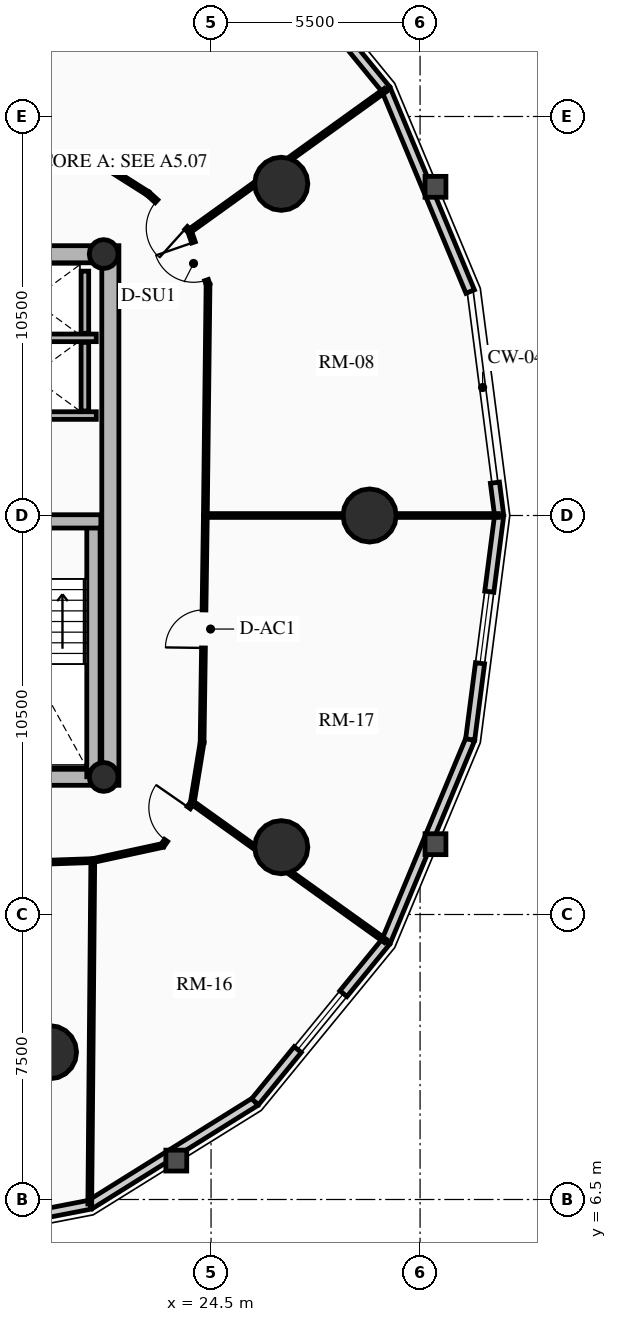
"""IFC4 building model, lengths in metres.
Left out: names, types, materials, properties, quantities, classifications, styles, units other than length and angle.
Written with IfcOpenShell. Run it as: python <this file> out.ifc"""

import sys

from ifc_helpers import new_model, si_unit, direction, frame, frame_2d, origin, origin_2d, place, context, subcontext, project, spatial, rectangle, circle, hollow_circle, extrude, source, transform, mapped, element, fill, save


model = new_model("IFC4")
c1 = context("Model", 3, precision=1e-05, world=origin(), true_north=direction((0.0, 1.0)))
c2 = subcontext(c1, "Body", "Model", "MODEL_VIEW")
j1 = project(units=[si_unit("LENGTHUNIT", "METRE"), si_unit("PLANEANGLEUNIT", "RADIAN")], contexts=[c1])
p1 = place(None, origin())
s1 = spatial("IfcSite", under=j1, at=p1, CompositionType="ELEMENT")
p2 = place(p1, origin())
s2 = spatial("IfcBuilding", under=s1, at=p2, CompositionType="ELEMENT")
p3 = place(p2, frame((0.0, 0.0, 96.34)))
s3 = spatial("IfcBuildingStorey", under=s2, at=p3, CompositionType="ELEMENT", Elevation=96.34)
p4 = place(p3, frame((21.85, 17.4, 0.0), z_axis=(0.0, 0.0, 1.0), x_axis=(0.0, 1.0, 0.0)))
e1 = element("IfcWall", 1, at=p4, inside=s3, PredefinedType="SHEAR", context=c2, shape_type="SweptSolid", body=[
    extrude(rectangle(XDim=14.2, YDim=0.45, at=frame_2d((7.1, 0.0))), origin(), (0.0, 0.0, 1.0), 2.91),
])
p5 = place(p3, frame((11.15, 17.625, 0.0), z_axis=(0.0, 0.0, 1.0), x_axis=(1.0, 0.0, 0.0)))
e2 = element("IfcWall", 2, at=p5, inside=s3, PredefinedType="SHEAR", context=c2, shape_type="SweptSolid", body=[
    extrude(rectangle(XDim=10.7, YDim=0.45, at=frame_2d((5.35, 0.0))), origin(), (0.0, 0.0, 1.0), 2.91),
])
m1 = source(origin(), c2, "Body", "SweptSolid", [
    extrude(rectangle(XDim=1.5, YDim=2.02, at=frame_2d((0.75, 1.01))), frame((0.0, 0.235, 0.0), z_axis=(0.0, -1.0, 0.0), x_axis=(1.0, 0.0, 0.0)), (0.0, 0.0, 1.0), 0.47),
])
p6 = place(p5, frame((5.45, 0.0, 0.0)))
e3 = element("IfcOpeningElement", 3, at=p6, cuts=e2, PredefinedType="OPENING", context=c2, shape_type="MappedRepresentation", body=[
    mapped(m1, transform((0.0, 0.0, 0.0), x_axis=(1.0, 0.0, 0.0), y_axis=(0.0, 1.0, 0.0), z_axis=(0.0, 0.0, 1.0), scale=1.0)),
])
p7 = place(p3, frame((11.15, 31.375, 0.0), z_axis=(0.0, 0.0, 1.0), x_axis=(1.0, 0.0, 0.0)))
e4 = element("IfcWall", 4, at=p7, inside=s3, PredefinedType="SHEAR", context=c2, shape_type="SweptSolid", body=[
    extrude(rectangle(XDim=10.7, YDim=0.45, at=frame_2d((5.35, 0.0))), origin(), (0.0, 0.0, 1.0), 2.91),
])
p8 = place(p7, frame((4.6, 0.0, 0.0)))
e5 = element("IfcOpeningElement", 5, at=p8, cuts=e4, PredefinedType="OPENING", context=c2, shape_type="MappedRepresentation", body=[
    mapped(m1, transform((0.0, 0.0, 0.0), x_axis=(1.0, 0.0, 0.0), y_axis=(0.0, 1.0, 0.0), z_axis=(0.0, 0.0, 1.0), scale=1.0)),
])
p9 = place(p3, frame((21.405, 17.625, 0.0), z_axis=(0.0, 0.0, 1.0), x_axis=(0.0, 1.0, 0.0)))
e6 = element("IfcWall", 6, at=p9, inside=s3, PredefinedType="SHEAR", context=c2, shape_type="SweptSolid", body=[
    extrude(rectangle(XDim=6.72, YDim=0.35, at=frame_2d((3.36, 0.0))), origin(), (0.0, 0.0, 1.0), 2.91),
])
p10 = place(p3, frame((18.315, 24.345, 0.0), z_axis=(0.0, 0.0, 1.0), x_axis=(1.0, 0.0, 0.0)))
e7 = element("IfcWall", 7, at=p10, inside=s3, PredefinedType="SHEAR", context=c2, shape_type="SweptSolid", body=[
    extrude(rectangle(XDim=3.285, YDim=0.35, at=frame_2d((1.643, 0.0))), origin(), (0.0, 0.0, 1.0), 2.91),
])
for number, where, z_axis, x_axis in (
    (8, (21.675, 17.62, 0.0), (0.0, 0.0, 1.0), (1.0, 0.0, 0.0)),
    (9, (21.675, 31.38, 0.0), (0.0, 0.0, 1.0), (1.0, 0.0, 0.0)),
):
    element("IfcColumn", number, at=place(p3, frame(where, z_axis=z_axis, x_axis=x_axis)), inside=s3, PredefinedType="COLUMN", context=c2, shape_type="SweptSolid", body=[
        extrude(hollow_circle(Radius=0.38, WallThickness=0.032, at=origin_2d()), origin(), (0.0, 0.0, 1.0), 2.91),
    ])
for number, where, z_axis, x_axis in (
    (10, (28.672, 24.5, 0.0), (0.0, 0.0, 1.0), (1.0, 0.0, 0.0)),
    (11, (26.347, 33.229, 0.0), (0.0, 0.0, 1.0), (1.0, 0.0, 0.0)),
    (12, (20.261, 10.377, 0.0), (0.0, 0.0, 1.0), (1.0, 0.0, 0.0)),
    (13, (26.347, 15.771, 0.0), (0.0, 0.0, 1.0), (1.0, 0.0, 0.0)),
):
    element("IfcColumn", number, at=place(p3, frame(where, z_axis=z_axis, x_axis=x_axis)), inside=s3, PredefinedType="USERDEFINED", context=c2, shape_type="SweptSolid", body=[
        extrude(circle(Radius=0.7, at=origin_2d()), origin(), (0.0, 0.0, 1.0), 2.91),
    ])
p11 = place(p3, frame((31.969, 25.363, 0.0), z_axis=(0.0, 0.0, 1.0), x_axis=(0.128523364007, -0.991706481225, 0.0)))
e14 = element("IfcWall", 14, at=p11, inside=s3, PredefinedType="SOLIDWALL", context=c2, shape_type="SweptSolid", body=[
    extrude(rectangle(XDim=0.87, YDim=0.24, at=frame_2d((0.435, 0.0))), origin(), (0.0, 0.0, 1.0), 2.655),
])
p12 = place(p3, frame((29.105, 35.709, 0.0), z_axis=(0.0, 0.0, 1.0), x_axis=(0.384344417632, -0.923189779317, 0.0)))
e15 = element("IfcWall", 15, at=p12, inside=s3, PredefinedType="SOLIDWALL", context=c2, shape_type="SweptSolid", body=[
    extrude(rectangle(XDim=5.758, YDim=0.24, at=frame_2d((2.879, 0.0))), origin(), (0.0, 0.0, 1.0), 2.179),
])
p13 = place(p3, frame((25.658, 39.928, 0.0), z_axis=(0.0, 0.0, 1.0), x_axis=(0.632700781152, -0.77439635945, 0.0)))
e16 = element("IfcWall", 16, at=p13, inside=s3, PredefinedType="SOLIDWALL", context=c2, shape_type="SweptSolid", body=[
    extrude(rectangle(XDim=5.448, YDim=0.24, at=frame_2d((2.724, 0.0))), origin(), (0.0, 0.0, 1.0), 2.179),
])
m2 = source(origin(), c2, "Body", "SweptSolid", [
    extrude(rectangle(XDim=1.9, YDim=1.35, at=frame_2d((0.95, 0.675))), frame((0.0, 0.13, 0.0), z_axis=(0.0, -1.0, 0.0), x_axis=(1.0, 0.0, 0.0)), (0.0, 0.0, 1.0), 0.26),
])
p14 = place(p13, frame((1.774, 0.0, 0.65)))
e17 = element("IfcOpeningElement", 17, at=p14, cuts=e16, PredefinedType="OPENING", context=c2, shape_type="MappedRepresentation", body=[
    mapped(m2, transform((0.0, 0.0, 0.0), x_axis=(1.0, 0.0, 0.0), y_axis=(0.0, 1.0, 0.0), z_axis=(0.0, 0.0, 1.0), scale=1.0)),
])
p15 = place(p3, frame((21.315, 6.363, 0.0), z_axis=(0.0, 0.0, 1.0), x_axis=(-0.981723785992, -0.190311344954, 0.0)))
e18 = element("IfcWall", 18, at=p15, inside=s3, PredefinedType="SOLIDWALL", context=c2, shape_type="SweptSolid", body=[
    extrude(rectangle(XDim=4.904, YDim=0.24, at=frame_2d((2.452, 0.0))), origin(), (0.0, 0.0, 1.0), 2.179),
])
m3 = source(origin(), c2, "Body", "SweptSolid", [
    extrude(rectangle(XDim=2.2, YDim=1.35, at=frame_2d((1.1, 0.675))), frame((0.0, 0.13, 0.0), z_axis=(0.0, -1.0, 0.0), x_axis=(1.0, 0.0, 0.0)), (0.0, 0.0, 1.0), 0.26),
])
p16 = place(p15, frame((1.352, 0.0, 0.65)))
e19 = element("IfcOpeningElement", 19, at=p16, cuts=e18, PredefinedType="OPENING", context=c2, shape_type="MappedRepresentation", body=[
    mapped(m3, transform((0.0, 0.0, 0.0), x_axis=(1.0, 0.0, 0.0), y_axis=(0.0, 1.0, 0.0), z_axis=(0.0, 0.0, 1.0), scale=1.0)),
])
p17 = place(p3, frame((25.658, 9.072, 0.0), z_axis=(0.0, 0.0, 1.0), x_axis=(-0.848520380187, -0.529162701263, 0.0)))
e20 = element("IfcWall", 20, at=p17, inside=s3, PredefinedType="SOLIDWALL", context=c2, shape_type="SweptSolid", body=[
    extrude(rectangle(XDim=5.119, YDim=0.24, at=frame_2d((2.56, 0.0))), origin(), (0.0, 0.0, 1.0), 2.179),
])
p18 = place(p3, frame((29.105, 13.291, 0.0), z_axis=(0.0, 0.0, 1.0), x_axis=(-0.632700781152, -0.77439635945, 0.0)))
e21 = element("IfcWall", 21, at=p18, inside=s3, PredefinedType="SOLIDWALL", context=c2, shape_type="SweptSolid", body=[
    extrude(rectangle(XDim=5.448, YDim=0.24, at=frame_2d((2.724, 0.0))), origin(), (0.0, 0.0, 1.0), 2.179),
])
p19 = place(p18, frame((1.774, 0.0, 0.65)))
e22 = element("IfcOpeningElement", 22, at=p19, cuts=e21, PredefinedType="OPENING", context=c2, shape_type="MappedRepresentation", body=[
    mapped(m2, transform((0.0, 0.0, 0.0), x_axis=(1.0, 0.0, 0.0), y_axis=(0.0, 1.0, 0.0), z_axis=(0.0, 0.0, 1.0), scale=1.0)),
])
p20 = place(p3, frame((31.318, 18.607, 0.0), z_axis=(0.0, 0.0, 1.0), x_axis=(-0.384344417632, -0.923189779317, 0.0)))
e23 = element("IfcWall", 23, at=p20, inside=s3, PredefinedType="SOLIDWALL", context=c2, shape_type="SweptSolid", body=[
    extrude(rectangle(XDim=5.758, YDim=0.24, at=frame_2d((2.879, 0.0))), origin(), (0.0, 0.0, 1.0), 2.179),
])
p21 = place(p3, frame((32.081, 24.5, 0.0), z_axis=(0.0, 0.0, 1.0), x_axis=(-0.128351991996, -0.991728675672, 0.0)))
e24 = element("IfcWall", 24, at=p21, inside=s3, PredefinedType="SOLIDWALL", context=c2, shape_type="SweptSolid", body=[
    extrude(rectangle(XDim=5.942, YDim=0.24, at=frame_2d((2.971, 0.0))), origin(), (0.0, 0.0, 1.0), 2.179),
])
p22 = place(p21, frame((2.021, 0.0, 0.65)))
e25 = element("IfcOpeningElement", 25, at=p22, cuts=e24, PredefinedType="OPENING", context=c2, shape_type="MappedRepresentation", body=[
    mapped(m2, transform((0.0, 0.0, 0.0), x_axis=(1.0, 0.0, 0.0), y_axis=(0.0, 1.0, 0.0), z_axis=(0.0, 0.0, 1.0), scale=1.0)),
])
for number, where, z_axis, x_axis in (
    (26, (18.51, 27.13, 0.0), (0.0, 0.0, 1.0), (1.0, 0.0, 0.0)),
    (27, (18.51, 29.175, 0.0), (0.0, 0.0, 1.0), (1.0, 0.0, 0.0)),
):
    element("IfcWall", number, at=place(p3, frame(where, z_axis=z_axis, x_axis=x_axis)), inside=s3, PredefinedType="SHEAR", context=c2, shape_type="SweptSolid", body=[
        extrude(rectangle(XDim=2.97, YDim=0.2, at=frame_2d((1.485, 0.0))), origin(), (0.0, 0.0, 1.0), 2.91),
    ])
p23 = place(p3, frame((21.18, 27.25, 0.0), z_axis=(0.0, 0.0, 1.0), x_axis=(0.0, 1.0, 0.0)))
e28 = element("IfcWall", 28, at=p23, inside=s3, PredefinedType="SHEAR", context=c2, shape_type="SweptSolid", body=[
    extrude(rectangle(XDim=1.805, YDim=0.2, at=frame_2d((0.902, 0.0))), origin(), (0.0, 0.0, 1.0), 2.91),
])
p24 = place(p3, frame((21.18, 29.295, 0.0), z_axis=(0.0, 0.0, 1.0), x_axis=(0.0, 1.0, 0.0)))
e29 = element("IfcWall", 29, at=p24, inside=s3, PredefinedType="SHEAR", context=c2, shape_type="SweptSolid", body=[
    extrude(rectangle(XDim=1.635, YDim=0.2, at=frame_2d((0.817, 0.0))), origin(), (0.0, 0.0, 1.0), 2.91),
])
p25 = place(p3, frame((24.35, 24.5, 0.0), z_axis=(0.0, 0.0, 1.0), x_axis=(0.011520250275, 0.999933639715, 0.0)))
e30 = element("IfcWall", 30, at=p25, inside=s3, PredefinedType="MOVABLE", context=c2, shape_type="SweptSolid", body=[
    extrude(rectangle(XDim=6.082, YDim=0.1, at=frame_2d((3.041, 0.0))), origin(), (0.0, 0.0, 1.0), 2.225),
])
p26 = place(p3, frame((24.42, 30.582, 0.0), z_axis=(0.0, 0.0, 1.0), x_axis=(-0.327437665675, 0.944872782494, 0.0)))
e31 = element("IfcWall", 31, at=p26, inside=s3, PredefinedType="MOVABLE", context=c2, shape_type="SweptSolid", body=[
    extrude(rectangle(XDim=1.487, YDim=0.1, at=frame_2d((0.743, 0.0))), origin(), (0.0, 0.0, 1.0), 2.225),
])
m4 = source(origin(), c2, "Body", "SweptSolid", [
    extrude(rectangle(XDim=1.05, YDim=2.015, at=frame_2d((0.525, 1.007))), frame((0.0, 0.06, 0.0), z_axis=(0.0, -1.0, 0.0), x_axis=(1.0, 0.0, 0.0)), (0.0, 0.0, 1.0), 0.12),
])
p27 = place(p26, frame((0.12, 0.0, 0.0)))
e32 = element("IfcOpeningElement", 32, at=p27, cuts=e31, PredefinedType="OPENING", context=c2, shape_type="MappedRepresentation", body=[
    mapped(m4, transform((0.0, 0.0, 0.0), x_axis=(1.0, 0.0, 0.0), y_axis=(0.0, 1.0, 0.0), z_axis=(0.0, 0.0, 1.0), scale=1.0)),
])
p28 = place(p3, frame((23.933, 31.987, 0.0), z_axis=(0.0, 0.0, 1.0), x_axis=(-0.742471347264, 0.669877823556, 0.0)))
e33 = element("IfcWall", 33, at=p28, inside=s3, PredefinedType="MOVABLE", context=c2, shape_type="SweptSolid", body=[
    extrude(rectangle(XDim=1.476, YDim=0.1, at=frame_2d((0.738, 0.0))), origin(), (0.0, 0.0, 1.0), 2.225),
])
p29 = place(p28, frame((0.12, 0.0, 0.0)))
e34 = element("IfcOpeningElement", 34, at=p29, cuts=e33, PredefinedType="OPENING", context=c2, shape_type="MappedRepresentation", body=[
    mapped(m4, transform((0.0, 0.0, 0.0), x_axis=(1.0, 0.0, 0.0), y_axis=(0.0, 1.0, 0.0), z_axis=(0.0, 0.0, 1.0), scale=1.0)),
])
p30 = place(p3, frame((22.837, 32.976, 0.0), z_axis=(0.0, 0.0, 1.0), x_axis=(-0.844976677144, 0.534803155454, 0.0)))
e35 = element("IfcWall", 35, at=p30, inside=s3, PredefinedType="MOVABLE", context=c2, shape_type="SweptSolid", body=[
    extrude(rectangle(XDim=1.587, YDim=0.1, at=frame_2d((0.793, 0.0))), origin(), (0.0, 0.0, 1.0), 2.225),
])
p31 = place(p3, frame((21.496, 33.824, 0.0), z_axis=(0.0, 0.0, 1.0), x_axis=(-0.999990516754, -0.004355043261, 0.0)))
e36 = element("IfcWall", 36, at=p31, inside=s3, PredefinedType="MOVABLE", context=c2, shape_type="SweptSolid", body=[
    extrude(rectangle(XDim=3.364, YDim=0.1, at=frame_2d((1.682, 0.0))), origin(), (0.0, 0.0, 1.0), 2.225),
])
p32 = place(p3, frame((14.792, 15.191, 0.0), z_axis=(0.0, 0.0, 1.0), x_axis=(0.999405559957, 0.034475015985, 0.0)))
e37 = element("IfcWall", 37, at=p32, inside=s3, PredefinedType="MOVABLE", context=c2, shape_type="SweptSolid", body=[
    extrude(rectangle(XDim=6.6, YDim=0.1, at=frame_2d((3.3, 0.0))), origin(), (0.0, 0.0, 1.0), 2.225),
])
p33 = place(p32, frame((2.775, 0.0, 0.0)))
e38 = element("IfcOpeningElement", 38, at=p33, cuts=e37, PredefinedType="OPENING", context=c2, shape_type="MappedRepresentation", body=[
    mapped(m4, transform((0.0, 0.0, 0.0), x_axis=(1.0, 0.0, 0.0), y_axis=(0.0, 1.0, 0.0), z_axis=(0.0, 0.0, 1.0), scale=1.0)),
])
p34 = place(p3, frame((21.388, 15.418, 0.0), z_axis=(0.0, 0.0, 1.0), x_axis=(0.977297113048, 0.211873435874, 0.0)))
e39 = element("IfcWall", 39, at=p34, inside=s3, PredefinedType="MOVABLE", context=c2, shape_type="SweptSolid", body=[
    extrude(rectangle(XDim=1.877, YDim=0.1, at=frame_2d((0.938, 0.0))), origin(), (0.0, 0.0, 1.0), 2.225),
])
p35 = place(p3, frame((23.222, 15.816, 0.0), z_axis=(0.0, 0.0, 1.0), x_axis=(0.57002280034, 0.821628874306, 0.0)))
e40 = element("IfcWall", 40, at=p35, inside=s3, PredefinedType="MOVABLE", context=c2, shape_type="SweptSolid", body=[
    extrude(rectangle(XDim=1.374, YDim=0.1, at=frame_2d((0.687, 0.0))), origin(), (0.0, 0.0, 1.0), 2.225),
])
p36 = place(p35, frame((0.162, 0.0, 0.0)))
e41 = element("IfcOpeningElement", 41, at=p36, cuts=e40, PredefinedType="OPENING", context=c2, shape_type="MappedRepresentation", body=[
    mapped(m4, transform((0.0, 0.0, 0.0), x_axis=(1.0, 0.0, 0.0), y_axis=(0.0, 1.0, 0.0), z_axis=(0.0, 0.0, 1.0), scale=1.0)),
])
p37 = place(p3, frame((24.006, 16.945, 0.0), z_axis=(0.0, 0.0, 1.0), x_axis=(0.161240753481, 0.986915102436, 0.0)))
e42 = element("IfcWall", 42, at=p37, inside=s3, PredefinedType="MOVABLE", context=c2, shape_type="SweptSolid", body=[
    extrude(rectangle(XDim=1.605, YDim=0.1, at=frame_2d((0.802, 0.0))), origin(), (0.0, 0.0, 1.0), 2.225),
])
p38 = place(p3, frame((24.264, 18.529, 0.0), z_axis=(0.0, 0.0, 1.0), x_axis=(0.014349654938, 0.999897038401, 0.0)))
e43 = element("IfcWall", 43, at=p38, inside=s3, PredefinedType="MOVABLE", context=c2, shape_type="SweptSolid", body=[
    extrude(rectangle(XDim=5.972, YDim=0.1, at=frame_2d((2.986, 0.0))), origin(), (0.0, 0.0, 1.0), 2.655),
])
m5 = source(origin(), c2, "Body", "SweptSolid", [
    extrude(rectangle(XDim=1.0, YDim=2.015, at=frame_2d((0.5, 1.007))), frame((0.0, 0.06, 0.0), z_axis=(0.0, -1.0, 0.0), x_axis=(1.0, 0.0, 0.0)), (0.0, 0.0, 1.0), 0.12),
])
p39 = place(p38, frame((2.486, 0.0, 0.0)))
e44 = element("IfcOpeningElement", 44, at=p39, cuts=e43, PredefinedType="OPENING", context=c2, shape_type="MappedRepresentation", body=[
    mapped(m5, transform((0.0, 0.0, 0.0), x_axis=(1.0, 0.0, 0.0), y_axis=(0.0, 1.0, 0.0), z_axis=(0.0, 0.0, 1.0), scale=1.0)),
])
p40 = place(p3, frame((24.35, 24.5, 0.0), z_axis=(0.0, 0.0, 1.0), x_axis=(1.0, 0.0, 0.0)))
e45 = element("IfcWall", 45, at=p40, inside=s3, PredefinedType="MOVABLE", context=c2, shape_type="SweptSolid", body=[
    extrude(rectangle(XDim=7.711, YDim=0.1, at=frame_2d((3.855, 0.0))), origin(), (0.0, 0.0, 1.0), 2.179),
])
p41 = place(p3, frame((23.933, 31.987, 0.0), z_axis=(0.0, 0.0, 1.0), x_axis=(0.811642946178, 0.584153856377, 0.0)))
e46 = element("IfcWall", 46, at=p41, inside=s3, PredefinedType="MOVABLE", context=c2, shape_type="SweptSolid", body=[
    extrude(rectangle(XDim=6.352, YDim=0.1, at=frame_2d((3.176, 0.0))), origin(), (0.0, 0.0, 1.0), 2.179),
])
p42 = place(p3, frame((21.388, 15.418, 0.0), z_axis=(0.0, 0.0, 1.0), x_axis=(-0.008780834631, -0.999961447728, 0.0)))
e47 = element("IfcWall", 47, at=p42, inside=s3, PredefinedType="MOVABLE", context=c2, shape_type="SweptSolid", body=[
    extrude(rectangle(XDim=9.036, YDim=0.1, at=frame_2d((4.518, 0.0))), origin(), (0.0, 0.0, 1.0), 2.179),
])
p43 = place(p3, frame((24.006, 16.945, 0.0), z_axis=(0.0, 0.0, 1.0), x_axis=(0.81289906925, -0.582404587219, 0.0)))
e48 = element("IfcWall", 48, at=p43, inside=s3, PredefinedType="MOVABLE", context=c2, shape_type="SweptSolid", body=[
    extrude(rectangle(XDim=6.253, YDim=0.1, at=frame_2d((3.127, 0.0))), origin(), (0.0, 0.0, 1.0), 2.179),
])
m6 = source(origin(), c2, "Body", "SweptSolid", [
    extrude(rectangle(XDim=1.9, YDim=1.35, at=frame_2d((0.95, 0.675))), frame((0.0, 0.03, 0.0), z_axis=(0.0, -1.0, 0.0), x_axis=(1.0, 0.0, 0.0)), (0.0, 0.0, 1.0), 0.06),
])
p44 = place(p19, origin())
e49 = element("IfcWindow", 49, at=p44, inside=s3, PartitioningType="DOUBLE_PANEL_VERTICAL", PredefinedType="WINDOW", context=c2, shape_type="MappedRepresentation", body=[
    mapped(m6, transform((0.0, 0.0, 0.0), x_axis=(1.0, 0.0, 0.0), y_axis=(0.0, 1.0, 0.0), z_axis=(0.0, 0.0, 1.0), scale=1.0)),
])
fill(e22, e49)
p45 = place(p22, origin())
e50 = element("IfcWindow", 50, at=p45, inside=s3, PartitioningType="DOUBLE_PANEL_VERTICAL", PredefinedType="WINDOW", context=c2, shape_type="MappedRepresentation", body=[
    mapped(m6, transform((0.0, 0.0, 0.0), x_axis=(1.0, 0.0, 0.0), y_axis=(0.0, 1.0, 0.0), z_axis=(0.0, 0.0, 1.0), scale=1.0)),
])
fill(e25, e50)
m7 = source(origin(), c2, "Body", "SweptSolid", [
    extrude(rectangle(XDim=1.05, YDim=2.015, at=frame_2d((0.525, 1.007))), frame((0.0, 0.025, 0.0), z_axis=(0.0, -1.0, 0.0), x_axis=(1.0, 0.0, 0.0)), (0.0, 0.0, 1.0), 0.05),
])
p46 = place(p27, origin())
e51 = element("IfcDoor", 51, at=p46, inside=s3, OperationType="SINGLE_SWING_RIGHT", PredefinedType="DOOR", context=c2, shape_type="MappedRepresentation", body=[
    mapped(m7, transform((0.0, 0.0, 0.0), x_axis=(1.0, 0.0, 0.0), y_axis=(0.0, 1.0, 0.0), z_axis=(0.0, 0.0, 1.0), scale=1.0)),
])
fill(e32, e51)
p47 = place(p29, origin())
e52 = element("IfcDoor", 52, at=p47, inside=s3, OperationType="SINGLE_SWING_LEFT", PredefinedType="DOOR", context=c2, shape_type="MappedRepresentation", body=[
    mapped(m7, transform((0.0, 0.0, 0.0), x_axis=(1.0, 0.0, 0.0), y_axis=(0.0, 1.0, 0.0), z_axis=(0.0, 0.0, 1.0), scale=1.0)),
])
fill(e34, e52)
p48 = place(p36, origin())
e53 = element("IfcDoor", 53, at=p48, inside=s3, OperationType="SINGLE_SWING_RIGHT", PredefinedType="DOOR", context=c2, shape_type="MappedRepresentation", body=[
    mapped(m7, transform((0.0, 0.0, 0.0), x_axis=(1.0, 0.0, 0.0), y_axis=(0.0, 1.0, 0.0), z_axis=(0.0, 0.0, 1.0), scale=1.0)),
])
fill(e41, e53)
m8 = source(origin(), c2, "Body", "SweptSolid", [
    extrude(rectangle(XDim=1.0, YDim=2.015, at=frame_2d((0.5, 1.007))), frame((0.0, 0.025, 0.0), z_axis=(0.0, -1.0, 0.0), x_axis=(1.0, 0.0, 0.0)), (0.0, 0.0, 1.0), 0.05),
])
p49 = place(p39, origin())
e54 = element("IfcDoor", 54, at=p49, inside=s3, OperationType="SINGLE_SWING_LEFT", PredefinedType="DOOR", context=c2, shape_type="MappedRepresentation", body=[
    mapped(m8, transform((0.0, 0.0, 0.0), x_axis=(1.0, 0.0, 0.0), y_axis=(0.0, 1.0, 0.0), z_axis=(0.0, 0.0, 1.0), scale=1.0)),
])
fill(e44, e54)
save(model, sys.argv[1])
